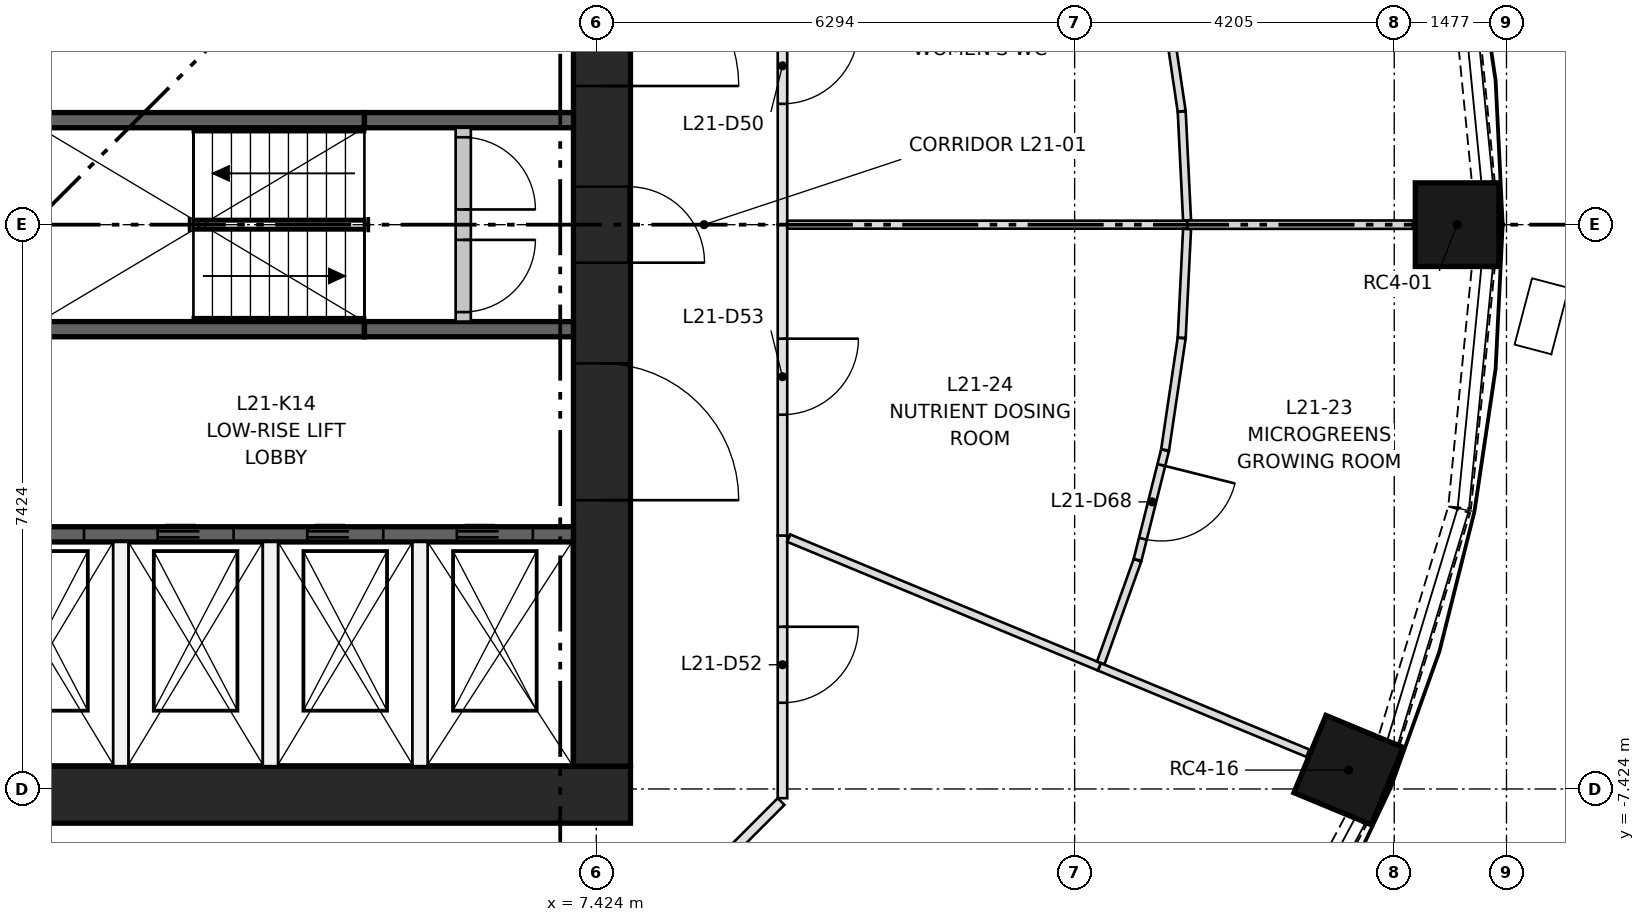
"""IFC4 building model, lengths in metres.
Left out: names, types, materials, properties, quantities, classifications, styles, units other than length and angle.
Written with IfcOpenShell. Run it as: python <this file> out.ifc"""

import sys

from ifc_helpers import new_model, si_unit, direction, frame, frame_2d, origin, origin_2d, place, context, subcontext, project, spatial, rectangle, extrude, element, fill, save


model = new_model("IFC4")
c1 = context("Model", 3, precision=1e-05, world=origin(), true_north=direction((0.0, 1.0)))
c2 = subcontext(c1, "Body", "Model", "MODEL_VIEW")
j1 = project(units=[si_unit("LENGTHUNIT", "METRE"), si_unit("PLANEANGLEUNIT", "RADIAN")], contexts=[c1])
p1 = place(None, origin())
s1 = spatial("IfcSite", under=j1, at=p1, CompositionType="ELEMENT")
p2 = place(p1, origin())
s2 = spatial("IfcBuilding", under=s1, at=p2, CompositionType="ELEMENT")
p3 = place(p2, frame((0.0, 0.0, 83.7)))
s3 = spatial("IfcBuildingStorey", under=s2, at=p3, CompositionType="ELEMENT", Elevation=83.7)
for number, where, z_axis, x_axis in (
    (1, (18.75, 0.0, 0.0), (0.0, 0.0, 1.0), (1.0, 0.0, 0.0)),
    (2, (17.323, -7.175, 0.0), (0.0, 0.0, 1.0), (0.924, -0.383, 0.0)),
):
    element("IfcColumn", number, at=place(p3, frame(where, z_axis=z_axis, x_axis=x_axis)), inside=s3, PredefinedType="COLUMN", context=c2, shape_type="SweptSolid", body=[
        extrude(rectangle(XDim=1.1, YDim=1.1, at=origin_2d()), origin(), (0.0, 0.0, 1.0), 3.65),
    ])
p4 = place(p3, frame((-7.874, -7.499, 0.0), z_axis=(0.0, 0.0, 1.0), x_axis=(1.0, 0.0, 0.0)))
e3 = element("IfcWall", 3, at=p4, inside=s3, PredefinedType="SHEAR", context=c2, shape_type="SweptSolid", body=[
    extrude(rectangle(XDim=15.748, YDim=0.75, at=frame_2d((7.874, 0.0))), origin(), (0.0, 0.0, 1.0), 3.65),
])
p5 = place(p3, frame((7.499, -7.124, 0.0), z_axis=(0.0, 0.0, 1.0), x_axis=(0.0, 1.0, 0.0)))
e4 = element("IfcWall", 4, at=p5, inside=s3, PredefinedType="SHEAR", context=c2, shape_type="SweptSolid", body=[
    extrude(rectangle(XDim=14.248, YDim=0.75, at=frame_2d((7.124, 0.0))), origin(), (0.0, 0.0, 1.0), 3.65),
])
p6 = place(p5, frame((6.624, 0.0, 0.0)))
e5 = element("IfcOpeningElement", 5, at=p6, cuts=e4, PredefinedType="OPENING", context=c2, shape_type="SweptSolid", body=[
    extrude(rectangle(XDim=1.0, YDim=2.1, at=frame_2d((0.5, 1.05))), frame((0.0, 0.385, 0.0), z_axis=(0.0, -1.0, 0.0), x_axis=(1.0, 0.0, 0.0)), (0.0, 0.0, 1.0), 0.77),
])
p7 = place(p5, frame((3.5, 0.0, 0.0)))
e6 = element("IfcOpeningElement", 6, at=p7, cuts=e4, PredefinedType="OPENING", context=c2, shape_type="SweptSolid", body=[
    extrude(rectangle(XDim=1.8, YDim=2.1, at=frame_2d((0.9, 1.05))), frame((0.0, 0.385, 0.0), z_axis=(0.0, -1.0, 0.0), x_axis=(1.0, 0.0, 0.0)), (0.0, 0.0, 1.0), 0.77),
])
p8 = place(p5, frame((8.948, 0.0, 0.0)))
e7 = element("IfcOpeningElement", 7, at=p8, cuts=e4, PredefinedType="OPENING", context=c2, shape_type="SweptSolid", body=[
    extrude(rectangle(XDim=1.8, YDim=2.1, at=frame_2d((0.9, 1.05))), frame((0.0, 0.385, 0.0), z_axis=(0.0, -1.0, 0.0), x_axis=(1.0, 0.0, 0.0)), (0.0, 0.0, 1.0), 0.77),
])
p9 = place(p3, frame((-7.124, -4.074, 0.0), z_axis=(0.0, 0.0, 1.0), x_axis=(1.0, 0.0, 0.0)))
e8 = element("IfcWall", 8, at=p9, inside=s3, PredefinedType="SHEAR", context=c2, shape_type="SweptSolid", body=[
    extrude(rectangle(XDim=14.248, YDim=0.2, at=frame_2d((7.124, 0.0))), origin(), (0.0, 0.0, 1.0), 3.3),
])
p10 = place(p9, frame((1.069, 0.0, 0.0)))
e9 = element("IfcOpeningElement", 9, at=p10, cuts=e8, PredefinedType="OPENING", context=c2, shape_type="SweptSolid", body=[
    extrude(rectangle(XDim=1.1, YDim=2.1, at=frame_2d((0.55, 1.05))), frame((0.0, 0.11, 0.0), z_axis=(0.0, -1.0, 0.0), x_axis=(1.0, 0.0, 0.0)), (0.0, 0.0, 1.0), 0.22),
])
p11 = place(p9, frame((4.206, 0.0, 0.0)))
e10 = element("IfcOpeningElement", 10, at=p11, cuts=e8, PredefinedType="OPENING", context=c2, shape_type="SweptSolid", body=[
    extrude(rectangle(XDim=1.1, YDim=2.1, at=frame_2d((0.55, 1.05))), frame((0.0, 0.11, 0.0), z_axis=(0.0, -1.0, 0.0), x_axis=(1.0, 0.0, 0.0)), (0.0, 0.0, 1.0), 0.22),
])
p12 = place(p9, frame((6.808, 0.0, 0.0)))
e11 = element("IfcOpeningElement", 11, at=p12, cuts=e8, PredefinedType="OPENING", context=c2, shape_type="SweptSolid", body=[
    extrude(rectangle(XDim=1.0, YDim=2.1, at=frame_2d((0.5, 1.05))), frame((0.0, 0.11, 0.0), z_axis=(0.0, -1.0, 0.0), x_axis=(1.0, 0.0, 0.0)), (0.0, 0.0, 1.0), 0.22),
])
p13 = place(p9, frame((8.777, 0.0, 0.0)))
e12 = element("IfcOpeningElement", 12, at=p13, cuts=e8, PredefinedType="OPENING", context=c2, shape_type="SweptSolid", body=[
    extrude(rectangle(XDim=1.0, YDim=2.1, at=frame_2d((0.5, 1.05))), frame((0.0, 0.11, 0.0), z_axis=(0.0, -1.0, 0.0), x_axis=(1.0, 0.0, 0.0)), (0.0, 0.0, 1.0), 0.22),
])
p14 = place(p9, frame((10.745, 0.0, 0.0)))
e13 = element("IfcOpeningElement", 13, at=p14, cuts=e8, PredefinedType="OPENING", context=c2, shape_type="SweptSolid", body=[
    extrude(rectangle(XDim=1.0, YDim=2.1, at=frame_2d((0.5, 1.05))), frame((0.0, 0.11, 0.0), z_axis=(0.0, -1.0, 0.0), x_axis=(1.0, 0.0, 0.0)), (0.0, 0.0, 1.0), 0.22),
])
p15 = place(p9, frame((12.714, 0.0, 0.0)))
e14 = element("IfcOpeningElement", 14, at=p15, cuts=e8, PredefinedType="OPENING", context=c2, shape_type="SweptSolid", body=[
    extrude(rectangle(XDim=1.0, YDim=2.1, at=frame_2d((0.5, 1.05))), frame((0.0, 0.11, 0.0), z_axis=(0.0, -1.0, 0.0), x_axis=(1.0, 0.0, 0.0)), (0.0, 0.0, 1.0), 0.22),
])
p16 = place(p3, frame((0.0, -1.375, 0.0), z_axis=(0.0, 0.0, 1.0), x_axis=(1.0, 0.0, 0.0)))
e15 = element("IfcWall", 15, at=p16, inside=s3, PredefinedType="SHEAR", context=c2, shape_type="SweptSolid", body=[
    extrude(rectangle(XDim=4.374, YDim=0.2, at=frame_2d((2.187, 0.0))), origin(), (0.0, 0.0, 1.0), 3.3),
])
p17 = place(p3, frame((4.374, -1.375, 0.0), z_axis=(0.0, 0.0, 1.0), x_axis=(1.0, 0.0, 0.0)))
e16 = element("IfcWall", 16, at=p17, inside=s3, PredefinedType="SHEAR", context=c2, shape_type="SweptSolid", body=[
    extrude(rectangle(XDim=2.75, YDim=0.2, at=frame_2d((1.375, 0.0))), origin(), (0.0, 0.0, 1.0), 3.3),
])
p18 = place(p3, frame((0.0, 1.375, 0.0), z_axis=(0.0, 0.0, 1.0), x_axis=(1.0, 0.0, 0.0)))
e17 = element("IfcWall", 17, at=p18, inside=s3, PredefinedType="SHEAR", context=c2, shape_type="SweptSolid", body=[
    extrude(rectangle(XDim=4.374, YDim=0.2, at=frame_2d((2.187, 0.0))), origin(), (0.0, 0.0, 1.0), 3.3),
])
p19 = place(p3, frame((4.374, 1.375, 0.0), z_axis=(0.0, 0.0, 1.0), x_axis=(1.0, 0.0, 0.0)))
e18 = element("IfcWall", 18, at=p19, inside=s3, PredefinedType="SHEAR", context=c2, shape_type="SweptSolid", body=[
    extrude(rectangle(XDim=2.75, YDim=0.2, at=frame_2d((1.375, 0.0))), origin(), (0.0, 0.0, 1.0), 3.3),
])
for number, where, z_axis, x_axis in (
    (19, (1.168, -7.124, 0.0), (0.0, 0.0, 1.0), (0.0, 1.0, 0.0)),
    (20, (3.137, -7.124, 0.0), (0.0, 0.0, 1.0), (0.0, 1.0, 0.0)),
    (21, (5.105, -7.124, 0.0), (0.0, 0.0, 1.0), (0.0, 1.0, 0.0)),
):
    element("IfcWall", number, at=place(p3, frame(where, z_axis=z_axis, x_axis=x_axis)), inside=s3, PredefinedType="PARTITIONING", context=c2, shape_type="SweptSolid", body=[
        extrude(rectangle(XDim=2.95, YDim=0.2, at=frame_2d((1.475, 0.0))), origin(), (0.0, 0.0, 1.0), 3.3),
    ])
p20 = place(p3, frame((5.674, -1.275, 0.0), z_axis=(0.0, 0.0, 1.0), x_axis=(0.0, 1.0, 0.0)))
e22 = element("IfcWall", 22, at=p20, inside=s3, PredefinedType="PARTITIONING", context=c2, shape_type="SweptSolid", body=[
    extrude(rectangle(XDim=2.55, YDim=0.2, at=frame_2d((1.275, 0.0))), origin(), (0.0, 0.0, 1.0), 3.3),
])
p21 = place(p20, frame((0.125, 0.0, 0.0)))
e23 = element("IfcOpeningElement", 23, at=p21, cuts=e22, PredefinedType="OPENING", context=c2, shape_type="SweptSolid", body=[
    extrude(rectangle(XDim=0.95, YDim=2.1, at=frame_2d((0.475, 1.05))), frame((0.0, 0.11, 0.0), z_axis=(0.0, -1.0, 0.0), x_axis=(1.0, 0.0, 0.0)), (0.0, 0.0, 1.0), 0.22),
])
p22 = place(p20, frame((1.475, 0.0, 0.0)))
e24 = element("IfcOpeningElement", 24, at=p22, cuts=e22, PredefinedType="OPENING", context=c2, shape_type="SweptSolid", body=[
    extrude(rectangle(XDim=0.95, YDim=2.1, at=frame_2d((0.475, 1.05))), frame((0.0, 0.11, 0.0), z_axis=(0.0, -1.0, 0.0), x_axis=(1.0, 0.0, 0.0)), (0.0, 0.0, 1.0), 0.22),
])
p23 = place(p3, frame((19.094, 0.564, 0.0), z_axis=(0.0, 0.0, 1.0), x_axis=(-0.098040704044, 0.995182405567, 0.0)))
e25 = element("IfcWall", 25, at=p23, inside=s3, PredefinedType="SOLIDWALL", context=c2, shape_type="SweptSolid", body=[
    extrude(rectangle(XDim=3.173, YDim=0.3, at=frame_2d((1.586, 0.0))), origin(), (0.0, 0.0, 1.0), 0.9),
])
p24 = place(p3, frame((15.929, -10.626, 0.0), z_axis=(0.0, 0.0, 1.0), x_axis=(0.471458802606, 0.88188808669, 0.0)))
e26 = element("IfcWall", 26, at=p24, inside=s3, PredefinedType="SOLIDWALL", context=c2, shape_type="SweptSolid", body=[
    extrude(rectangle(XDim=3.172, YDim=0.3, at=frame_2d((1.586, 0.0))), origin(), (0.0, 0.0, 1.0), 0.9),
])
p25 = place(p3, frame((17.856, -6.787, 0.0), z_axis=(0.0, 0.0, 1.0), x_axis=(0.290325591482, 0.956927923582, 0.0)))
e27 = element("IfcWall", 27, at=p25, inside=s3, PredefinedType="SOLIDWALL", context=c2, shape_type="SweptSolid", body=[
    extrude(rectangle(XDim=3.173, YDim=0.3, at=frame_2d((1.586, 0.0))), origin(), (0.0, 0.0, 1.0), 0.9),
])
p26 = place(p3, frame((18.783, -3.721, 0.0), z_axis=(0.0, 0.0, 1.0), x_axis=(0.098040704044, 0.995182405567, 0.0)))
e28 = element("IfcWall", 28, at=p26, inside=s3, PredefinedType="SOLIDWALL", context=c2, shape_type="SweptSolid", body=[
    extrude(rectangle(XDim=3.173, YDim=0.3, at=frame_2d((1.586, 0.0))), origin(), (0.0, 0.0, 1.0), 0.9),
])
p27 = place(p3, frame((9.874, 4.09, 0.0), z_axis=(0.0, 0.0, 1.0), x_axis=(0.0, -1.0, 0.0)))
e29 = element("IfcWall", 29, at=p27, inside=s3, PredefinedType="PARTITIONING", context=c2, shape_type="SweptSolid", body=[
    extrude(rectangle(XDim=4.09, YDim=0.125, at=frame_2d((2.045, 0.0))), origin(), (0.0, 0.0, 1.0), 3.3),
])
p28 = place(p27, frame((1.5, 0.0, 0.0)))
e30 = element("IfcOpeningElement", 30, at=p28, cuts=e29, PredefinedType="OPENING", context=c2, shape_type="SweptSolid", body=[
    extrude(rectangle(XDim=1.0, YDim=2.1, at=frame_2d((0.5, 1.05))), frame((0.0, 0.073, 0.0), z_axis=(0.0, -1.0, 0.0), x_axis=(1.0, 0.0, 0.0)), (0.0, 0.0, 1.0), 0.145),
])
p29 = place(p3, frame((9.856, -7.589, 0.0), z_axis=(0.0, 0.0, 1.0), x_axis=(-0.70718294931, -0.707030604857, 0.0)))
e31 = element("IfcWall", 31, at=p29, inside=s3, PredefinedType="PARTITIONING", context=c2, shape_type="SweptSolid", body=[
    extrude(rectangle(XDim=1.603, YDim=0.125, at=frame_2d((0.801, 0.0))), origin(), (0.0, 0.0, 1.0), 3.3),
])
p30 = place(p3, frame((9.874, -4.09, 0.0), z_axis=(0.0, 0.0, 1.0), x_axis=(0.0, -1.0, 0.0)))
e32 = element("IfcWall", 32, at=p30, inside=s3, PredefinedType="PARTITIONING", context=c2, shape_type="SweptSolid", body=[
    extrude(rectangle(XDim=3.455, YDim=0.125, at=frame_2d((1.728, 0.0))), origin(), (0.0, 0.0, 1.0), 3.3),
])
p31 = place(p30, frame((1.2, 0.0, 0.0)))
e33 = element("IfcOpeningElement", 33, at=p31, cuts=e32, PredefinedType="OPENING", context=c2, shape_type="SweptSolid", body=[
    extrude(rectangle(XDim=1.0, YDim=2.1, at=frame_2d((0.5, 1.05))), frame((0.0, 0.073, 0.0), z_axis=(0.0, -1.0, 0.0), x_axis=(1.0, 0.0, 0.0)), (0.0, 0.0, 1.0), 0.145),
])
p32 = place(p3, frame((9.874, 0.0, 0.0), z_axis=(0.0, 0.0, 1.0), x_axis=(0.0, -1.0, 0.0)))
e34 = element("IfcWall", 34, at=p32, inside=s3, PredefinedType="PARTITIONING", context=c2, shape_type="SweptSolid", body=[
    extrude(rectangle(XDim=4.09, YDim=0.125, at=frame_2d((2.045, 0.0))), origin(), (0.0, 0.0, 1.0), 3.3),
])
p33 = place(p32, frame((1.5, 0.0, 0.0)))
e35 = element("IfcOpeningElement", 35, at=p33, cuts=e34, PredefinedType="OPENING", context=c2, shape_type="SweptSolid", body=[
    extrude(rectangle(XDim=1.0, YDim=2.1, at=frame_2d((0.5, 1.05))), frame((0.0, 0.073, 0.0), z_axis=(0.0, -1.0, 0.0), x_axis=(1.0, 0.0, 0.0)), (0.0, 0.0, 1.0), 0.145),
])
p34 = place(p3, frame((14.908, 2.963, 0.0), z_axis=(0.0, 0.0, 1.0), x_axis=(0.146822447166, -0.989162862732, 0.0)))
e36 = element("IfcWall", 36, at=p34, inside=s3, PredefinedType="PARTITIONING", context=c2, shape_type="SweptSolid", body=[
    extrude(rectangle(XDim=1.487, YDim=0.105, at=frame_2d((0.743, 0.0))), origin(), (0.0, 0.0, 1.0), 3.3),
])
p35 = place(p3, frame((15.127, 1.487, 0.0), z_axis=(0.0, 0.0, 1.0), x_axis=(0.0491209592, -0.998792837062, 0.0)))
e37 = element("IfcWall", 37, at=p35, inside=s3, PredefinedType="PARTITIONING", context=c2, shape_type="SweptSolid", body=[
    extrude(rectangle(XDim=1.431, YDim=0.105, at=frame_2d((0.716, 0.0))), origin(), (0.0, 0.0, 1.0), 3.3),
])
p36 = place(p3, frame((15.2, 0.0, 0.0), z_axis=(0.0, 0.0, 1.0), x_axis=(-1.0, 0.0, 0.0)))
e38 = element("IfcWall", 38, at=p36, inside=s3, PredefinedType="PARTITIONING", context=c2, shape_type="SweptSolid", body=[
    extrude(rectangle(XDim=5.263, YDim=0.105, at=frame_2d((2.632, 0.0))), origin(), (0.0, 0.0, 1.0), 3.3),
])
p37 = place(p3, frame((18.17, 0.0, 0.0), z_axis=(0.0, 0.0, 1.0), x_axis=(-1.0, 0.0, 0.0)))
e39 = element("IfcWall", 39, at=p37, inside=s3, PredefinedType="PARTITIONING", context=c2, shape_type="SweptSolid", body=[
    extrude(rectangle(XDim=2.97, YDim=0.11, at=frame_2d((1.485, 0.0))), origin(), (0.0, 0.0, 1.0), 3.3),
])
p38 = place(p3, frame((14.043, -5.817, 0.0), z_axis=(0.0, 0.0, 1.0), x_axis=(0.923889594764, -0.382659139036, 0.0)))
e40 = element("IfcWall", 40, at=p38, inside=s3, PredefinedType="PARTITIONING", context=c2, shape_type="SweptSolid", body=[
    extrude(rectangle(XDim=2.97, YDim=0.105, at=frame_2d((1.485, 0.0))), origin(), (0.0, 0.0, 1.0), 3.3),
])
p39 = place(p3, frame((9.957, -4.124, 0.0), z_axis=(0.0, 0.0, 1.0), x_axis=(0.923862097388, -0.382725521764, 0.0)))
e41 = element("IfcWall", 41, at=p39, inside=s3, PredefinedType="PARTITIONING", context=c2, shape_type="SweptSolid", body=[
    extrude(rectangle(XDim=4.423, YDim=0.105, at=frame_2d((2.211, 0.0))), origin(), (0.0, 0.0, 1.0), 3.3),
])
p40 = place(p3, frame((14.062, -5.765, 0.0), z_axis=(0.0, 0.0, 1.0), x_axis=(0.336940319535, 0.941526006583, 0.0)))
e42 = element("IfcWall", 42, at=p40, inside=s3, PredefinedType="PARTITIONING", context=c2, shape_type="SweptSolid", body=[
    extrude(rectangle(XDim=1.434, YDim=0.105, at=frame_2d((0.717, 0.0))), origin(), (0.0, 0.0, 1.0), 3.3),
])
p41 = place(p3, frame((14.907, -2.968, 0.0), z_axis=(0.0, 0.0, 1.0), x_axis=(-0.242922070527, -0.970045806986, 0.0)))
e43 = element("IfcWall", 43, at=p41, inside=s3, PredefinedType="PARTITIONING", context=c2, shape_type="SweptSolid", body=[
    extrude(rectangle(XDim=1.486, YDim=0.105, at=frame_2d((0.743, 0.0))), origin(), (0.0, 0.0, 1.0), 3.3),
])
p42 = place(p41, frame((0.2, 0.0, 0.0)))
e44 = element("IfcOpeningElement", 44, at=p42, cuts=e43, PredefinedType="OPENING", context=c2, shape_type="SweptSolid", body=[
    extrude(rectangle(XDim=1.0, YDim=2.1, at=frame_2d((0.5, 1.05))), frame((0.0, 0.062, 0.0), z_axis=(0.0, -1.0, 0.0), x_axis=(1.0, 0.0, 0.0)), (0.0, 0.0, 1.0), 0.125),
])
p43 = place(p3, frame((14.908, -2.963, 0.0), z_axis=(0.0, 0.0, 1.0), x_axis=(0.146822447166, 0.989162862732, 0.0)))
e45 = element("IfcWall", 45, at=p43, inside=s3, PredefinedType="PARTITIONING", context=c2, shape_type="SweptSolid", body=[
    extrude(rectangle(XDim=1.487, YDim=0.105, at=frame_2d((0.743, 0.0))), origin(), (0.0, 0.0, 1.0), 3.3),
])
p44 = place(p3, frame((15.127, -1.487, 0.0), z_axis=(0.0, 0.0, 1.0), x_axis=(0.0491209592, 0.998792837062, 0.0)))
e46 = element("IfcWall", 46, at=p44, inside=s3, PredefinedType="PARTITIONING", context=c2, shape_type="SweptSolid", body=[
    extrude(rectangle(XDim=1.431, YDim=0.105, at=frame_2d((0.716, 0.0))), origin(), (0.0, 0.0, 1.0), 3.3),
])
p45 = place(p12, origin())
e47 = element("IfcDoor", 47, at=p45, inside=s3, OperationType="DOUBLE_DOOR_SLIDING", PredefinedType="DOOR", context=c2, shape_type="SweptSolid", body=[
    extrude(rectangle(XDim=1.0, YDim=2.1, at=frame_2d((0.5, 1.05))), frame((0.0, 0.025, 0.0), z_axis=(0.0, -1.0, 0.0), x_axis=(1.0, 0.0, 0.0)), (0.0, 0.0, 1.0), 0.05),
])
fill(e11, e47)
p46 = place(p13, origin())
e48 = element("IfcDoor", 48, at=p46, inside=s3, OperationType="DOUBLE_DOOR_SLIDING", PredefinedType="DOOR", context=c2, shape_type="SweptSolid", body=[
    extrude(rectangle(XDim=1.0, YDim=2.1, at=frame_2d((0.5, 1.05))), frame((0.0, 0.025, 0.0), z_axis=(0.0, -1.0, 0.0), x_axis=(1.0, 0.0, 0.0)), (0.0, 0.0, 1.0), 0.05),
])
fill(e12, e48)
p47 = place(p14, origin())
e49 = element("IfcDoor", 49, at=p47, inside=s3, OperationType="DOUBLE_DOOR_SLIDING", PredefinedType="DOOR", context=c2, shape_type="SweptSolid", body=[
    extrude(rectangle(XDim=1.0, YDim=2.1, at=frame_2d((0.5, 1.05))), frame((0.0, 0.025, 0.0), z_axis=(0.0, -1.0, 0.0), x_axis=(1.0, 0.0, 0.0)), (0.0, 0.0, 1.0), 0.05),
])
fill(e13, e49)
p48 = place(p15, origin())
e50 = element("IfcDoor", 50, at=p48, inside=s3, OperationType="DOUBLE_DOOR_SLIDING", PredefinedType="DOOR", context=c2, shape_type="SweptSolid", body=[
    extrude(rectangle(XDim=1.0, YDim=2.1, at=frame_2d((0.5, 1.05))), frame((0.0, 0.025, 0.0), z_axis=(0.0, -1.0, 0.0), x_axis=(1.0, 0.0, 0.0)), (0.0, 0.0, 1.0), 0.05),
])
fill(e14, e50)
p49 = place(p21, frame((0.95, 0.0, 0.0), z_axis=(0.0, 0.0, 1.0), x_axis=(-1.0, 0.0, 0.0)))
e51 = element("IfcDoor", 51, at=p49, inside=s3, OperationType="SINGLE_SWING_RIGHT", PredefinedType="DOOR", context=c2, shape_type="SweptSolid", body=[
    extrude(rectangle(XDim=0.95, YDim=2.1, at=frame_2d((0.475, 1.05))), frame((0.0, 0.025, 0.0), z_axis=(0.0, -1.0, 0.0), x_axis=(1.0, 0.0, 0.0)), (0.0, 0.0, 1.0), 0.05),
])
fill(e23, e51)
p50 = place(p22, frame((0.95, 0.0, 0.0), z_axis=(0.0, 0.0, 1.0), x_axis=(-1.0, 0.0, 0.0)))
e52 = element("IfcDoor", 52, at=p50, inside=s3, OperationType="SINGLE_SWING_LEFT", PredefinedType="DOOR", context=c2, shape_type="SweptSolid", body=[
    extrude(rectangle(XDim=0.95, YDim=2.1, at=frame_2d((0.475, 1.05))), frame((0.0, 0.025, 0.0), z_axis=(0.0, -1.0, 0.0), x_axis=(1.0, 0.0, 0.0)), (0.0, 0.0, 1.0), 0.05),
])
fill(e24, e52)
p51 = place(p6, frame((1.0, 0.0, 0.0), z_axis=(0.0, 0.0, 1.0), x_axis=(-1.0, 0.0, 0.0)))
e53 = element("IfcDoor", 53, at=p51, inside=s3, OperationType="SINGLE_SWING_LEFT", PredefinedType="DOOR", context=c2, shape_type="SweptSolid", body=[
    extrude(rectangle(XDim=1.0, YDim=2.1, at=frame_2d((0.5, 1.05))), frame((0.0, 0.375, 0.0), z_axis=(0.0, -1.0, 0.0), x_axis=(1.0, 0.0, 0.0)), (0.0, 0.0, 1.0), 0.05),
])
fill(e5, e53)
p52 = place(p7, frame((1.8, 0.0, 0.0), z_axis=(0.0, 0.0, 1.0), x_axis=(-1.0, 0.0, 0.0)))
e54 = element("IfcDoor", 54, at=p52, inside=s3, OperationType="DOUBLE_DOOR_SINGLE_SWING", PredefinedType="DOOR", context=c2, shape_type="SweptSolid", body=[
    extrude(rectangle(XDim=1.8, YDim=2.1, at=frame_2d((0.9, 1.05))), frame((0.0, 0.025, 0.0), z_axis=(0.0, -1.0, 0.0), x_axis=(1.0, 0.0, 0.0)), (0.0, 0.0, 1.0), 0.05),
])
fill(e6, e54)
p53 = place(p8, frame((1.8, 0.0, 0.0), z_axis=(0.0, 0.0, 1.0), x_axis=(-1.0, 0.0, 0.0)))
e55 = element("IfcDoor", 55, at=p53, inside=s3, OperationType="DOUBLE_DOOR_SINGLE_SWING", PredefinedType="DOOR", context=c2, shape_type="SweptSolid", body=[
    extrude(rectangle(XDim=1.8, YDim=2.1, at=frame_2d((0.9, 1.05))), frame((0.0, 0.025, 0.0), z_axis=(0.0, -1.0, 0.0), x_axis=(1.0, 0.0, 0.0)), (0.0, 0.0, 1.0), 0.05),
])
fill(e7, e55)
p54 = place(p28, origin())
e56 = element("IfcDoor", 56, at=p54, inside=s3, OperationType="SINGLE_SWING_LEFT", PredefinedType="DOOR", context=c2, shape_type="SweptSolid", body=[
    extrude(rectangle(XDim=1.0, YDim=2.1, at=frame_2d((0.5, 1.05))), frame((0.0, 0.025, 0.0), z_axis=(0.0, -1.0, 0.0), x_axis=(1.0, 0.0, 0.0)), (0.0, 0.0, 1.0), 0.05),
])
fill(e30, e56)
p55 = place(p31, origin())
e57 = element("IfcDoor", 57, at=p55, inside=s3, OperationType="SINGLE_SWING_LEFT", PredefinedType="DOOR", context=c2, shape_type="SweptSolid", body=[
    extrude(rectangle(XDim=1.0, YDim=2.1, at=frame_2d((0.5, 1.05))), frame((0.0, 0.025, 0.0), z_axis=(0.0, -1.0, 0.0), x_axis=(1.0, 0.0, 0.0)), (0.0, 0.0, 1.0), 0.05),
])
fill(e33, e57)
p56 = place(p33, origin())
e58 = element("IfcDoor", 58, at=p56, inside=s3, OperationType="SINGLE_SWING_LEFT", PredefinedType="DOOR", context=c2, shape_type="SweptSolid", body=[
    extrude(rectangle(XDim=1.0, YDim=2.1, at=frame_2d((0.5, 1.05))), frame((0.0, 0.025, 0.0), z_axis=(0.0, -1.0, 0.0), x_axis=(1.0, 0.0, 0.0)), (0.0, 0.0, 1.0), 0.05),
])
fill(e35, e58)
p57 = place(p42, origin())
e59 = element("IfcDoor", 59, at=p57, inside=s3, OperationType="SINGLE_SWING_LEFT", PredefinedType="DOOR", context=c2, shape_type="SweptSolid", body=[
    extrude(rectangle(XDim=1.0, YDim=2.1, at=frame_2d((0.5, 1.05))), frame((0.0, 0.025, 0.0), z_axis=(0.0, -1.0, 0.0), x_axis=(1.0, 0.0, 0.0)), (0.0, 0.0, 1.0), 0.05),
])
fill(e44, e59)
save(model, sys.argv[1])
